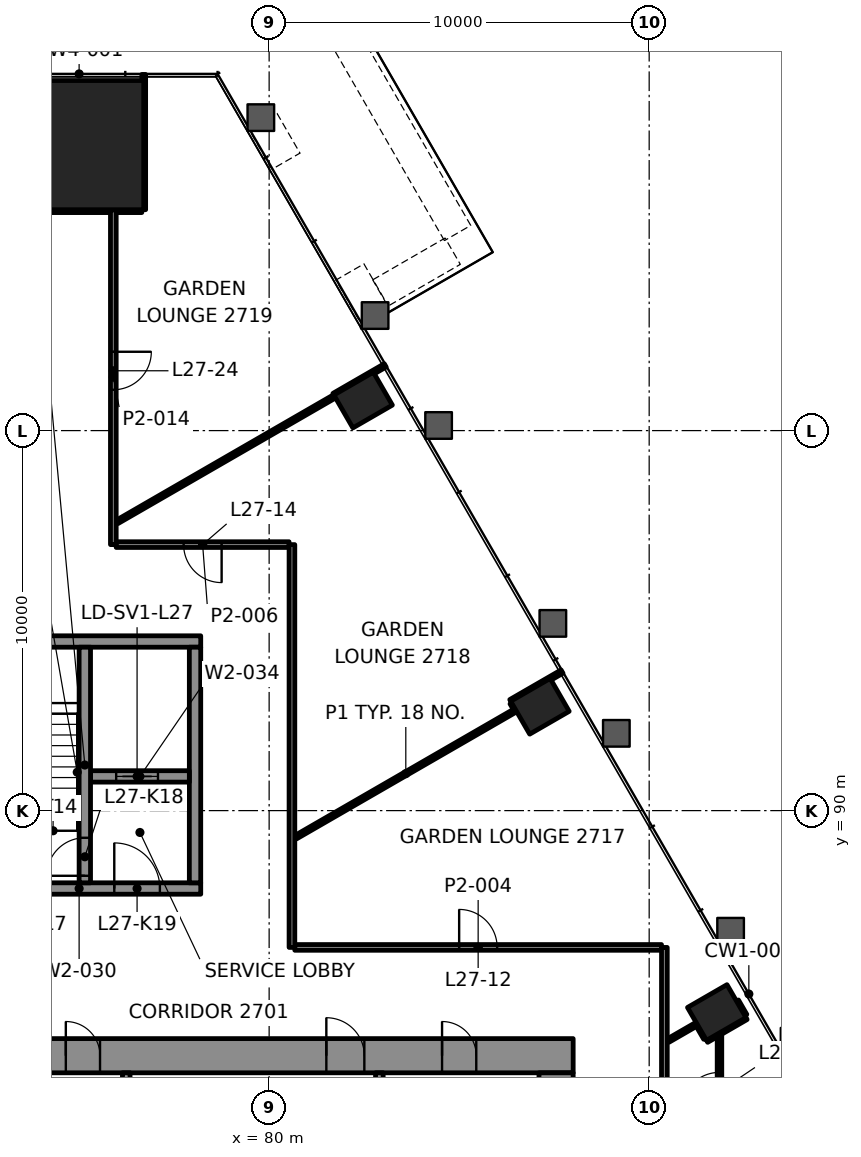
"""IFC4 building model, lengths in metres.
Left out: names, types, materials, properties, quantities, classifications, styles, units other than length and angle.
Written with IfcOpenShell. Run it as: python <this file> out.ifc"""

import sys

from ifc_helpers import new_model, si_unit, direction, frame, frame_2d, origin, origin_2d, place, context, subcontext, project, spatial, rectangle, extrude, element, fill, save


model = new_model("IFC4")
c1 = context("Model", 3, precision=1e-05, world=origin(), true_north=direction((0.0, 1.0)))
c2 = subcontext(c1, "Body", "Model", "MODEL_VIEW")
j1 = project(units=[si_unit("LENGTHUNIT", "METRE"), si_unit("PLANEANGLEUNIT", "RADIAN")], contexts=[c1])
p1 = place(None, origin())
s1 = spatial("IfcSite", under=j1, at=p1, CompositionType="ELEMENT")
p2 = place(p1, origin())
s2 = spatial("IfcBuilding", under=s1, at=p2, CompositionType="ELEMENT")
p3 = place(p2, frame((0.0, 0.0, 119.8)))
s3 = spatial("IfcBuildingStorey", under=s2, at=p3, CompositionType="ELEMENT", Elevation=119.8)
p4 = place(p3, frame((75.0, 107.512, 0.0), z_axis=(0.0, 0.0, 1.0), x_axis=(-1.0, 0.0, 0.0)))
e1 = element("IfcColumn", 1, at=p4, inside=s3, PredefinedType="COLUMN", context=c2, shape_type="SweptSolid", body=[
    extrude(rectangle(XDim=3.4, YDim=3.4, at=origin_2d()), origin(), (0.0, 0.0, 1.0), 4.2),
])
for number, where, z_axis, x_axis in (
    (2, (91.778, 84.687, -0.0), (0.0, 0.0, 1.0), (-0.5, 0.866, 0.0)),
    (3, (87.126, 92.745, -0.0), (0.0, 0.0, 1.0), (-0.5, 0.866, 0.0)),
    (4, (82.473, 100.804, -0.0), (0.0, 0.0, 1.0), (-0.5, 0.866, 0.0)),
):
    element("IfcColumn", number, at=place(p3, frame(where, z_axis=z_axis, x_axis=x_axis)), inside=s3, PredefinedType="COLUMN", context=c2, shape_type="SweptSolid", body=[
        extrude(rectangle(XDim=1.0, YDim=1.2, at=origin_2d()), origin(), (0.0, 0.0, 1.0), 4.2),
    ])
p5 = place(p3, frame((62.0, 83.55, 0.0), z_axis=(0.0, 0.0, 1.0), x_axis=(1.0, 0.0, 0.0)))
e5 = element("IfcWall", 5, at=p5, inside=s3, PredefinedType="SHEAR", context=c2, shape_type="SweptSolid", body=[
    extrude(rectangle(XDim=26.0, YDim=0.9, at=frame_2d((13.0, 0.0))), origin(), (0.0, 0.0, 1.0), 4.0),
])
p6 = place(p5, frame((5.695, 0.0, 0.0)))
e6 = element("IfcOpeningElement", 6, at=p6, cuts=e5, PredefinedType="OPENING", context=c2, shape_type="SweptSolid", body=[
    extrude(rectangle(XDim=1.0, YDim=2.1, at=frame_2d((0.5, 1.05))), frame((0.0, 0.46, 0.0), z_axis=(0.0, -1.0, 0.0), x_axis=(1.0, 0.0, 0.0)), (0.0, 0.0, 1.0), 0.92),
])
p7 = place(p5, frame((19.505, 0.0, 0.0)))
e7 = element("IfcOpeningElement", 7, at=p7, cuts=e5, PredefinedType="OPENING", context=c2, shape_type="SweptSolid", body=[
    extrude(rectangle(XDim=1.0, YDim=2.1, at=frame_2d((0.5, 1.05))), frame((0.0, 0.46, 0.0), z_axis=(0.0, -1.0, 0.0), x_axis=(1.0, 0.0, 0.0)), (0.0, 0.0, 1.0), 0.92),
])
p8 = place(p5, frame((3.45, 0.0, 0.0)))
e8 = element("IfcOpeningElement", 8, at=p8, cuts=e5, PredefinedType="OPENING", context=c2, shape_type="SweptSolid", body=[
    extrude(rectangle(XDim=0.9, YDim=2.1, at=frame_2d((0.45, 1.05))), frame((0.0, 0.46, 0.0), z_axis=(0.0, -1.0, 0.0), x_axis=(1.0, 0.0, 0.0)), (0.0, 0.0, 1.0), 0.92),
])
p9 = place(p5, frame((12.65, 0.0, 0.0)))
e9 = element("IfcOpeningElement", 9, at=p9, cuts=e5, PredefinedType="OPENING", context=c2, shape_type="SweptSolid", body=[
    extrude(rectangle(XDim=0.9, YDim=2.1, at=frame_2d((0.45, 1.05))), frame((0.0, 0.46, 0.0), z_axis=(0.0, -1.0, 0.0), x_axis=(1.0, 0.0, 0.0)), (0.0, 0.0, 1.0), 0.92),
])
p10 = place(p5, frame((22.55, 0.0, 0.0)))
e10 = element("IfcOpeningElement", 10, at=p10, cuts=e5, PredefinedType="OPENING", context=c2, shape_type="SweptSolid", body=[
    extrude(rectangle(XDim=0.9, YDim=2.1, at=frame_2d((0.45, 1.05))), frame((0.0, 0.46, 0.0), z_axis=(0.0, -1.0, 0.0), x_axis=(1.0, 0.0, 0.0)), (0.0, 0.0, 1.0), 0.92),
])
p11 = place(p3, frame((87.55, 66.9, 0.0), z_axis=(0.0, 0.0, 1.0), x_axis=(0.0, 1.0, 0.0)))
e11 = element("IfcWall", 11, at=p11, inside=s3, PredefinedType="SHEAR", context=c2, shape_type="SweptSolid", body=[
    extrude(rectangle(XDim=16.2, YDim=0.9, at=frame_2d((8.1, 0.0))), origin(), (0.0, 0.0, 1.0), 4.0),
])
p12 = place(p11, frame((5.5, 0.0, 0.0)))
e12 = element("IfcOpeningElement", 12, at=p12, cuts=e11, PredefinedType="OPENING", context=c2, shape_type="SweptSolid", body=[
    extrude(rectangle(XDim=1.8, YDim=2.1, at=frame_2d((0.9, 1.05))), frame((0.0, 0.46, 0.0), z_axis=(0.0, -1.0, 0.0), x_axis=(1.0, 0.0, 0.0)), (0.0, 0.0, 1.0), 0.92),
])
p13 = place(p11, frame((11.738, 0.0, 0.0)))
e13 = element("IfcOpeningElement", 13, at=p13, cuts=e11, PredefinedType="OPENING", context=c2, shape_type="SweptSolid", body=[
    extrude(rectangle(XDim=0.9, YDim=2.1, at=frame_2d((0.45, 1.05))), frame((0.0, 0.46, 0.0), z_axis=(0.0, -1.0, 0.0), x_axis=(1.0, 0.0, 0.0)), (0.0, 0.0, 1.0), 0.92),
])
p14 = place(p3, frame((71.8, 87.95, 0.0), z_axis=(0.0, 0.0, 1.0), x_axis=(1.0, 0.0, 0.0)))
e14 = element("IfcWall", 14, at=p14, inside=s3, PredefinedType="SHEAR", context=c2, shape_type="SweptSolid", body=[
    extrude(rectangle(XDim=6.4, YDim=0.3, at=frame_2d((3.2, 0.0))), origin(), (0.0, 0.0, 1.0), 4.0),
])
p15 = place(p14, frame((1.325, 0.0, 0.0)))
e15 = element("IfcOpeningElement", 15, at=p15, cuts=e14, PredefinedType="OPENING", context=c2, shape_type="SweptSolid", body=[
    extrude(rectangle(XDim=1.0, YDim=2.1, at=frame_2d((0.5, 1.05))), frame((0.0, 0.16, 0.0), z_axis=(0.0, -1.0, 0.0), x_axis=(1.0, 0.0, 0.0)), (0.0, 0.0, 1.0), 0.32),
])
p16 = place(p14, frame((4.125, 0.0, 0.0)))
e16 = element("IfcOpeningElement", 16, at=p16, cuts=e14, PredefinedType="OPENING", context=c2, shape_type="SweptSolid", body=[
    extrude(rectangle(XDim=1.2, YDim=2.1, at=frame_2d((0.6, 1.05))), frame((0.0, 0.16, 0.0), z_axis=(0.0, -1.0, 0.0), x_axis=(1.0, 0.0, 0.0)), (0.0, 0.0, 1.0), 0.32),
])
p17 = place(p3, frame((71.8, 94.45, 0.0), z_axis=(0.0, 0.0, 1.0), x_axis=(1.0, 0.0, 0.0)))
e17 = element("IfcWall", 17, at=p17, inside=s3, PredefinedType="SHEAR", context=c2, shape_type="SweptSolid", body=[
    extrude(rectangle(XDim=6.4, YDim=0.3, at=frame_2d((3.2, 0.0))), origin(), (0.0, 0.0, 1.0), 4.0),
])
p18 = place(p3, frame((78.05, 88.1, 0.0), z_axis=(0.0, 0.0, 1.0), x_axis=(0.0, 1.0, 0.0)))
e18 = element("IfcWall", 18, at=p18, inside=s3, PredefinedType="SHEAR", context=c2, shape_type="SweptSolid", body=[
    extrude(rectangle(XDim=6.2, YDim=0.3, at=frame_2d((3.1, 0.0))), origin(), (0.0, 0.0, 1.0), 4.0),
])
p19 = place(p3, frame((75.3, 90.9, 0.0), z_axis=(0.0, 0.0, 1.0), x_axis=(1.0, 0.0, 0.0)))
e19 = element("IfcWall", 19, at=p19, inside=s3, PredefinedType="SHEAR", context=c2, shape_type="SweptSolid", body=[
    extrude(rectangle(XDim=2.6, YDim=0.3, at=frame_2d((1.3, 0.0))), origin(), (0.0, 0.0, 1.0), 4.0),
])
p20 = place(p19, frame((0.675, 0.0, 0.0)))
e20 = element("IfcOpeningElement", 20, at=p20, cuts=e19, PredefinedType="OPENING", context=c2, shape_type="SweptSolid", body=[
    extrude(rectangle(XDim=1.1, YDim=2.1, at=frame_2d((0.55, 1.05))), frame((0.0, 0.16, 0.0), z_axis=(0.0, -1.0, 0.0), x_axis=(1.0, 0.0, 0.0)), (0.0, 0.0, 1.0), 0.32),
])
p21 = place(p3, frame((75.15, 88.1, 0.0), z_axis=(0.0, 0.0, 1.0), x_axis=(0.0, 1.0, 0.0)))
e21 = element("IfcWall", 21, at=p21, inside=s3, PredefinedType="SHEAR", context=c2, shape_type="SweptSolid", body=[
    extrude(rectangle(XDim=6.2, YDim=0.3, at=frame_2d((3.1, 0.0))), origin(), (0.0, 0.0, 1.0), 4.0),
])
p22 = place(p21, frame((0.185, 0.0, 0.0)))
e22 = element("IfcOpeningElement", 22, at=p22, cuts=e21, PredefinedType="OPENING", context=c2, shape_type="SweptSolid", body=[
    extrude(rectangle(XDim=1.0, YDim=2.1, at=frame_2d((0.5, 1.05))), frame((0.0, 0.16, 0.0), z_axis=(0.0, -1.0, 0.0), x_axis=(1.0, 0.0, 0.0)), (0.0, 0.0, 1.0), 0.32),
])
p23 = place(p3, frame((80.675, 86.4, 0.0), z_axis=(0.0, 0.0, 1.0), x_axis=(1.0, 0.0, 0.0)))
e23 = element("IfcWall", 23, at=p23, inside=s3, PredefinedType="PARTITIONING", context=c2, shape_type="SweptSolid", body=[
    extrude(rectangle(XDim=9.649, YDim=0.15, at=frame_2d((4.825, 0.0))), origin(), (0.0, 0.0, 1.0), 3.4),
])
p24 = place(p23, frame((4.325, 0.0, 0.0)))
e24 = element("IfcOpeningElement", 24, at=p24, cuts=e23, PredefinedType="OPENING", context=c2, shape_type="SweptSolid", body=[
    extrude(rectangle(XDim=1.0, YDim=2.1, at=frame_2d((0.5, 1.05))), frame((0.0, 0.085, 0.0), z_axis=(0.0, -1.0, 0.0), x_axis=(1.0, 0.0, 0.0)), (0.0, 0.0, 1.0), 0.17),
])
p25 = place(p3, frame((80.524, 97.0, 0.0), z_axis=(0.0, 0.0, 1.0), x_axis=(-1.0, 0.0, 0.0)))
e25 = element("IfcWall", 25, at=p25, inside=s3, PredefinedType="PARTITIONING", context=c2, shape_type="SweptSolid", body=[
    extrude(rectangle(XDim=4.549, YDim=0.15, at=frame_2d((2.275, 0.0))), origin(), (0.0, 0.0, 1.0), 3.4),
])
p26 = place(p25, frame((1.775, 0.0, 0.0)))
e26 = element("IfcOpeningElement", 26, at=p26, cuts=e25, PredefinedType="OPENING", context=c2, shape_type="SweptSolid", body=[
    extrude(rectangle(XDim=1.0, YDim=2.1, at=frame_2d((0.5, 1.05))), frame((0.0, 0.085, 0.0), z_axis=(0.0, -1.0, 0.0), x_axis=(1.0, 0.0, 0.0)), (0.0, 0.0, 1.0), 0.17),
])
p27 = place(p3, frame((74.176, 105.812, 0.0), z_axis=(0.0, 0.0, 1.0), x_axis=(1.0, 0.0, 0.0)))
e27 = element("IfcWall", 27, at=p27, inside=s3, PredefinedType="PARTITIONING", context=c2, shape_type="SweptSolid", body=[
    extrude(rectangle(XDim=1.649, YDim=0.15, at=frame_2d((0.825, 0.0))), origin(), (0.0, 0.0, 1.0), 3.397),
])
p28 = place(p3, frame((91.509, 83.954, 0.0), z_axis=(0.0, 0.0, 1.0), x_axis=(0.865905532852, 0.500207565094, 0.0)))
e28 = element("IfcWall", 28, at=p28, inside=s3, PredefinedType="PARTITIONING", context=c2, shape_type="SweptSolid", body=[
    extrude(rectangle(XDim=0.291, YDim=0.12, at=frame_2d((0.145, 0.0))), origin(), (0.0, 0.0, 1.0), 3.4),
])
p29 = place(p3, frame((90.501, 83.95, 0.0), z_axis=(0.0, 0.0, 1.0), x_axis=(0.866069322143, 0.499923923456, 0.0)))
e29 = element("IfcWall", 29, at=p29, inside=s3, PredefinedType="PARTITIONING", context=c2, shape_type="SweptSolid", body=[
    extrude(rectangle(XDim=0.874, YDim=0.1, at=frame_2d((0.437, 0.0))), origin(), (0.0, 0.0, 1.0), 3.4),
])
p30 = place(p3, frame((80.701, 89.302, 0.0), z_axis=(0.0, 0.0, 1.0), x_axis=(0.866032345022, 0.499987977232, 0.0)))
e30 = element("IfcWall", 30, at=p30, inside=s3, PredefinedType="PARTITIONING", context=c2, shape_type="SweptSolid", body=[
    extrude(rectangle(XDim=6.686, YDim=0.1, at=frame_2d((3.343, 0.0))), origin(), (0.0, 0.0, 1.0), 3.4),
])
p31 = place(p3, frame((86.356, 92.879, 0.0), z_axis=(0.0, 0.0, 1.0), x_axis=(0.866018739521, 0.500011542666, 0.0)))
e31 = element("IfcWall", 31, at=p31, inside=s3, PredefinedType="PARTITIONING", context=c2, shape_type="SweptSolid", body=[
    extrude(rectangle(XDim=1.56, YDim=0.1, at=frame_2d((0.78, 0.0))), origin(), (0.0, 0.0, 1.0), 3.165),
])
p32 = place(p3, frame((76.001, 97.598, 0.0), z_axis=(0.0, 0.0, 1.0), x_axis=(0.866017611601, 0.500013496215, 0.0)))
e32 = element("IfcWall", 32, at=p32, inside=s3, PredefinedType="PARTITIONING", context=c2, shape_type="SweptSolid", body=[
    extrude(rectangle(XDim=6.608, YDim=0.1, at=frame_2d((3.304, 0.0))), origin(), (0.0, 0.0, 1.0), 3.4),
])
p33 = place(p3, frame((81.704, 100.937, 0.0), z_axis=(0.0, 0.0, 1.0), x_axis=(0.865990094875, 0.500061151839, 0.0)))
e33 = element("IfcWall", 33, at=p33, inside=s3, PredefinedType="PARTITIONING", context=c2, shape_type="SweptSolid", body=[
    extrude(rectangle(XDim=1.56, YDim=0.1, at=frame_2d((0.78, 0.0))), origin(), (0.0, 0.0, 1.0), 3.4),
])
p34 = place(p3, frame((91.85, 76.67, 0.0), z_axis=(0.0, 0.0, 1.0), x_axis=(0.0, 1.0, 0.0)))
e34 = element("IfcWall", 34, at=p34, inside=s3, PredefinedType="PARTITIONING", context=c2, shape_type="SweptSolid", body=[
    extrude(rectangle(XDim=7.481, YDim=0.12, at=frame_2d((3.741, 0.0))), origin(), (0.0, 0.0, 1.0), 3.4),
])
p35 = place(p34, frame((0.803, 0.0, 0.0)))
e35 = element("IfcOpeningElement", 35, at=p35, cuts=e34, PredefinedType="OPENING", context=c2, shape_type="SweptSolid", body=[
    extrude(rectangle(XDim=0.9, YDim=2.1, at=frame_2d((0.45, 1.05))), frame((0.0, 0.07, 0.0), z_axis=(0.0, -1.0, 0.0), x_axis=(1.0, 0.0, 0.0)), (0.0, 0.0, 1.0), 0.14),
])
p36 = place(p34, frame((3.004, 0.0, 0.0)))
e36 = element("IfcOpeningElement", 36, at=p36, cuts=e34, PredefinedType="OPENING", context=c2, shape_type="SweptSolid", body=[
    extrude(rectangle(XDim=0.9, YDim=2.1, at=frame_2d((0.45, 1.05))), frame((0.0, 0.07, 0.0), z_axis=(0.0, -1.0, 0.0), x_axis=(1.0, 0.0, 0.0)), (0.0, 0.0, 1.0), 0.14),
])
p37 = place(p34, frame((5.441, 0.0, 0.0)))
e37 = element("IfcOpeningElement", 37, at=p37, cuts=e34, PredefinedType="OPENING", context=c2, shape_type="SweptSolid", body=[
    extrude(rectangle(XDim=1.0, YDim=2.1, at=frame_2d((0.5, 1.05))), frame((0.0, 0.07, 0.0), z_axis=(0.0, -1.0, 0.0), x_axis=(1.0, 0.0, 0.0)), (0.0, 0.0, 1.0), 0.14),
])
p38 = place(p3, frame((90.4, 86.399, 0.0), z_axis=(0.0, 0.0, 1.0), x_axis=(0.0, -1.0, 0.0)))
e38 = element("IfcWall", 38, at=p38, inside=s3, PredefinedType="PARTITIONING", context=c2, shape_type="SweptSolid", body=[
    extrude(rectangle(XDim=19.251, YDim=0.15, at=frame_2d((9.626, 0.0))), origin(), (0.0, 0.0, 1.0), 3.4),
])
p39 = place(p38, frame((5.937, 0.0, 0.0)))
e39 = element("IfcOpeningElement", 39, at=p39, cuts=e38, PredefinedType="OPENING", context=c2, shape_type="SweptSolid", body=[
    extrude(rectangle(XDim=1.2, YDim=2.1, at=frame_2d((0.6, 1.05))), frame((0.0, 0.085, 0.0), z_axis=(0.0, -1.0, 0.0), x_axis=(1.0, 0.0, 0.0)), (0.0, 0.0, 1.0), 0.17),
])
p40 = place(p38, frame((14.207, 0.0, 0.0)))
e40 = element("IfcOpeningElement", 40, at=p40, cuts=e38, PredefinedType="OPENING", context=c2, shape_type="SweptSolid", body=[
    extrude(rectangle(XDim=1.2, YDim=2.1, at=frame_2d((0.6, 1.05))), frame((0.0, 0.085, 0.0), z_axis=(0.0, -1.0, 0.0), x_axis=(1.0, 0.0, 0.0)), (0.0, 0.0, 1.0), 0.17),
])
p41 = place(p3, frame((80.6, 86.4, 0.0), z_axis=(0.0, 0.0, 1.0), x_axis=(0.0, 1.0, 0.0)))
e41 = element("IfcWall", 41, at=p41, inside=s3, PredefinedType="PARTITIONING", context=c2, shape_type="SweptSolid", body=[
    extrude(rectangle(XDim=10.6, YDim=0.15, at=frame_2d((5.3, 0.0))), origin(), (0.0, 0.0, 1.0), 3.322),
])
p42 = place(p3, frame((76.7, 105.813, 0.0), z_axis=(0.0, 0.0, 1.0), x_axis=(0.0, 1.0, 0.0)))
e42 = element("IfcWall", 42, at=p42, inside=s3, PredefinedType="PARTITIONING", context=c2, shape_type="SweptSolid", body=[
    extrude(rectangle(XDim=3.559, YDim=0.1, at=frame_2d((1.78, 0.0))), origin(), (0.0, 0.0, 1.0), 3.4),
])
p43 = place(p3, frame((75.9, 105.812, 0.0), z_axis=(0.0, 0.0, 1.0), x_axis=(0.0, -1.0, 0.0)))
e43 = element("IfcWall", 43, at=p43, inside=s3, PredefinedType="PARTITIONING", context=c2, shape_type="SweptSolid", body=[
    extrude(rectangle(XDim=8.812, YDim=0.15, at=frame_2d((4.406, 0.0))), origin(), (0.0, 0.0, 1.0), 3.4),
])
p44 = place(p43, frame((3.738, 0.0, 0.0)))
e44 = element("IfcOpeningElement", 44, at=p44, cuts=e43, PredefinedType="OPENING", context=c2, shape_type="SweptSolid", body=[
    extrude(rectangle(XDim=1.0, YDim=2.1, at=frame_2d((0.5, 1.05))), frame((0.0, 0.085, 0.0), z_axis=(0.0, -1.0, 0.0), x_axis=(1.0, 0.0, 0.0)), (0.0, 0.0, 1.0), 0.17),
])
p45 = place(p3, frame((92.518, 84.606, 0.0), z_axis=(0.0, 0.0, 1.0), x_axis=(-0.499962889934, 0.866046828231, 0.0)))
e45 = element("IfcWall", 45, at=p45, inside=s3, PredefinedType="PARTITIONING", context=c2, shape_type="SweptSolid", body=[
    extrude(rectangle(XDim=0.439, YDim=0.12, at=frame_2d((0.22, 0.0))), origin(), (0.0, 0.0, 1.0), 3.4),
])
p46 = place(p3, frame((91.479, 84.006, 0.0), z_axis=(0.0, 0.0, 1.0), x_axis=(-0.499649997908, 0.866227383307, 0.0)))
e46 = element("IfcWall", 46, at=p46, inside=s3, PredefinedType="PARTITIONING", context=c2, shape_type="SweptSolid", body=[
    extrude(rectangle(XDim=0.389, YDim=0.1, at=frame_2d((0.194, 0.0))), origin(), (0.0, 0.0, 1.0), 3.4),
])
p47 = place(p3, frame((86.466, 92.688, 0.0), z_axis=(0.0, 0.0, 1.0), x_axis=(-0.500013496215, 0.866017611601, 0.0)))
e47 = element("IfcWall", 47, at=p47, inside=s3, PredefinedType="PARTITIONING", context=c2, shape_type="SweptSolid", body=[
    extrude(rectangle(XDim=0.169, YDim=0.1, at=frame_2d((0.085, 0.0))), origin(), (0.0, 0.0, 1.0), 3.4),
])
p48 = place(p3, frame((75.975, 105.812, 0.0), z_axis=(0.0, 0.0, 1.0), x_axis=(1.0, 0.0, 0.0)))
e48 = element("IfcWall", 48, at=p48, inside=s3, PredefinedType="PARTITIONING", context=c2, shape_type="SweptSolid", body=[
    extrude(rectangle(XDim=0.674, YDim=0.15, at=frame_2d((0.337, 0.0))), origin(), (0.0, 0.0, 1.0), 3.4),
])
p49 = place(p3, frame((91.895, 84.177, 0.0), z_axis=(0.0, 0.0, 1.0), x_axis=(0.865980481111, 0.500077800282, 0.0)))
e49 = element("IfcWall", 49, at=p49, inside=s3, PredefinedType="PARTITIONING", context=c2, shape_type="SweptSolid", body=[
    extrude(rectangle(XDim=0.753, YDim=0.12, at=frame_2d((0.377, 0.0))), origin(), (0.0, 0.0, 1.0), 3.165),
])
p50 = place(p3, frame((82.925, 103.621, 0.0), z_axis=(0.0, 0.0, 1.0), x_axis=(0.86605622881, 0.499946605688, 0.0)))
e50 = element("IfcWall", 50, at=p50, inside=s3, PredefinedType="SOLIDWALL", context=c2, shape_type="SweptSolid", body=[
    extrude(rectangle(XDim=2.2, YDim=0.8, at=frame_2d((1.1, 0.0))), origin(), (0.0, 0.0, 1.0), 0.9),
])
p51 = place(p3, frame((84.958, 105.199, 0.0), z_axis=(0.0, 0.0, 1.0), x_axis=(-0.500001609966, 0.866024474268, 0.0)))
e51 = element("IfcWall", 51, at=p51, inside=s3, PredefinedType="SOLIDWALL", context=c2, shape_type="SweptSolid", body=[
    extrude(rectangle(XDim=8.151, YDim=0.8, at=frame_2d((4.075, 0.0))), origin(), (0.0, 0.0, 1.0), 0.9),
])
for number, where, z_axis, x_axis in (
    (52, (76.24, 81.28, 0.0), (0.0, 0.0, 1.0), (0.0, 1.0, 0.0)),
    (53, (82.9, 81.28, 0.0), (0.0, 0.0, 1.0), (0.0, 1.0, 0.0)),
):
    element("IfcWall", number, at=place(p3, frame(where, z_axis=z_axis, x_axis=x_axis)), inside=s3, PredefinedType="PARTITIONING", context=c2, shape_type="SweptSolid", body=[
        extrude(rectangle(XDim=1.82, YDim=0.2, at=frame_2d((0.91, 0.0))), origin(), (0.0, 0.0, 1.0), 4.0),
    ])
p52 = place(p24, origin())
e54 = element("IfcDoor", 54, at=p52, inside=s3, OperationType="SINGLE_SWING_RIGHT", PredefinedType="DOOR", context=c2, shape_type="SweptSolid", body=[
    extrude(rectangle(XDim=1.0, YDim=2.1, at=frame_2d((0.5, 1.05))), frame((0.0, 0.025, 0.0), z_axis=(0.0, -1.0, 0.0), x_axis=(1.0, 0.0, 0.0)), (0.0, 0.0, 1.0), 0.05),
])
fill(e24, e54)
p53 = place(p26, origin())
e55 = element("IfcDoor", 55, at=p53, inside=s3, OperationType="SINGLE_SWING_RIGHT", PredefinedType="DOOR", context=c2, shape_type="SweptSolid", body=[
    extrude(rectangle(XDim=1.0, YDim=2.1, at=frame_2d((0.5, 1.05))), frame((0.0, 0.025, 0.0), z_axis=(0.0, -1.0, 0.0), x_axis=(1.0, 0.0, 0.0)), (0.0, 0.0, 1.0), 0.05),
])
fill(e26, e55)
p54 = place(p37, origin())
e56 = element("IfcDoor", 56, at=p54, inside=s3, OperationType="SINGLE_SWING_LEFT", PredefinedType="DOOR", context=c2, shape_type="SweptSolid", body=[
    extrude(rectangle(XDim=1.0, YDim=2.1, at=frame_2d((0.5, 1.05))), frame((0.0, 0.025, 0.0), z_axis=(0.0, -1.0, 0.0), x_axis=(1.0, 0.0, 0.0)), (0.0, 0.0, 1.0), 0.05),
])
fill(e37, e56)
p55 = place(p44, origin())
e57 = element("IfcDoor", 57, at=p55, inside=s3, OperationType="SINGLE_SWING_LEFT", PredefinedType="DOOR", context=c2, shape_type="SweptSolid", body=[
    extrude(rectangle(XDim=1.0, YDim=2.1, at=frame_2d((0.5, 1.05))), frame((0.0, 0.025, 0.0), z_axis=(0.0, -1.0, 0.0), x_axis=(1.0, 0.0, 0.0)), (0.0, 0.0, 1.0), 0.05),
])
fill(e44, e57)
p56 = place(p20, origin())
e58 = element("IfcDoor", 58, at=p56, inside=s3, OperationType="DOUBLE_DOOR_SLIDING", PredefinedType="DOOR", context=c2, shape_type="SweptSolid", body=[
    extrude(rectangle(XDim=1.1, YDim=2.1, at=frame_2d((0.55, 1.05))), frame((0.0, 0.025, 0.0), z_axis=(0.0, -1.0, 0.0), x_axis=(1.0, 0.0, 0.0)), (0.0, 0.0, 1.0), 0.05),
])
fill(e20, e58)
p57 = place(p7, origin())
e59 = element("IfcDoor", 59, at=p57, inside=s3, OperationType="SINGLE_SWING_LEFT", PredefinedType="DOOR", context=c2, shape_type="SweptSolid", body=[
    extrude(rectangle(XDim=1.0, YDim=2.1, at=frame_2d((0.5, 1.05))), frame((0.0, 0.17, 0.0), z_axis=(0.0, -1.0, 0.0), x_axis=(1.0, 0.0, 0.0)), (0.0, 0.0, 1.0), 0.34),
])
fill(e7, e59)
p58 = place(p22, origin())
e60 = element("IfcDoor", 60, at=p58, inside=s3, OperationType="SINGLE_SWING_LEFT", PredefinedType="DOOR", context=c2, shape_type="SweptSolid", body=[
    extrude(rectangle(XDim=1.0, YDim=2.1, at=frame_2d((0.5, 1.05))), frame((0.0, 0.025, 0.0), z_axis=(0.0, -1.0, 0.0), x_axis=(1.0, 0.0, 0.0)), (0.0, 0.0, 1.0), 0.05),
])
fill(e22, e60)
p59 = place(p16, origin())
e61 = element("IfcDoor", 61, at=p59, inside=s3, OperationType="SINGLE_SWING_RIGHT", PredefinedType="DOOR", context=c2, shape_type="SweptSolid", body=[
    extrude(rectangle(XDim=1.2, YDim=2.1, at=frame_2d((0.6, 1.05))), frame((0.0, 0.025, 0.0), z_axis=(0.0, -1.0, 0.0), x_axis=(1.0, 0.0, 0.0)), (0.0, 0.0, 1.0), 0.05),
])
fill(e16, e61)
p60 = place(p9, origin())
e62 = element("IfcDoor", 62, at=p60, inside=s3, OperationType="SINGLE_SWING_LEFT", PredefinedType="DOOR", context=c2, shape_type="SweptSolid", body=[
    extrude(rectangle(XDim=0.9, YDim=2.1, at=frame_2d((0.45, 1.05))), frame((0.0, 0.17, 0.0), z_axis=(0.0, -1.0, 0.0), x_axis=(1.0, 0.0, 0.0)), (0.0, 0.0, 1.0), 0.34),
])
fill(e9, e62)
p61 = place(p10, origin())
e63 = element("IfcDoor", 63, at=p61, inside=s3, OperationType="SINGLE_SWING_LEFT", PredefinedType="DOOR", context=c2, shape_type="SweptSolid", body=[
    extrude(rectangle(XDim=0.9, YDim=2.1, at=frame_2d((0.45, 1.05))), frame((0.0, 0.17, 0.0), z_axis=(0.0, -1.0, 0.0), x_axis=(1.0, 0.0, 0.0)), (0.0, 0.0, 1.0), 0.34),
])
fill(e10, e63)
save(model, sys.argv[1])
